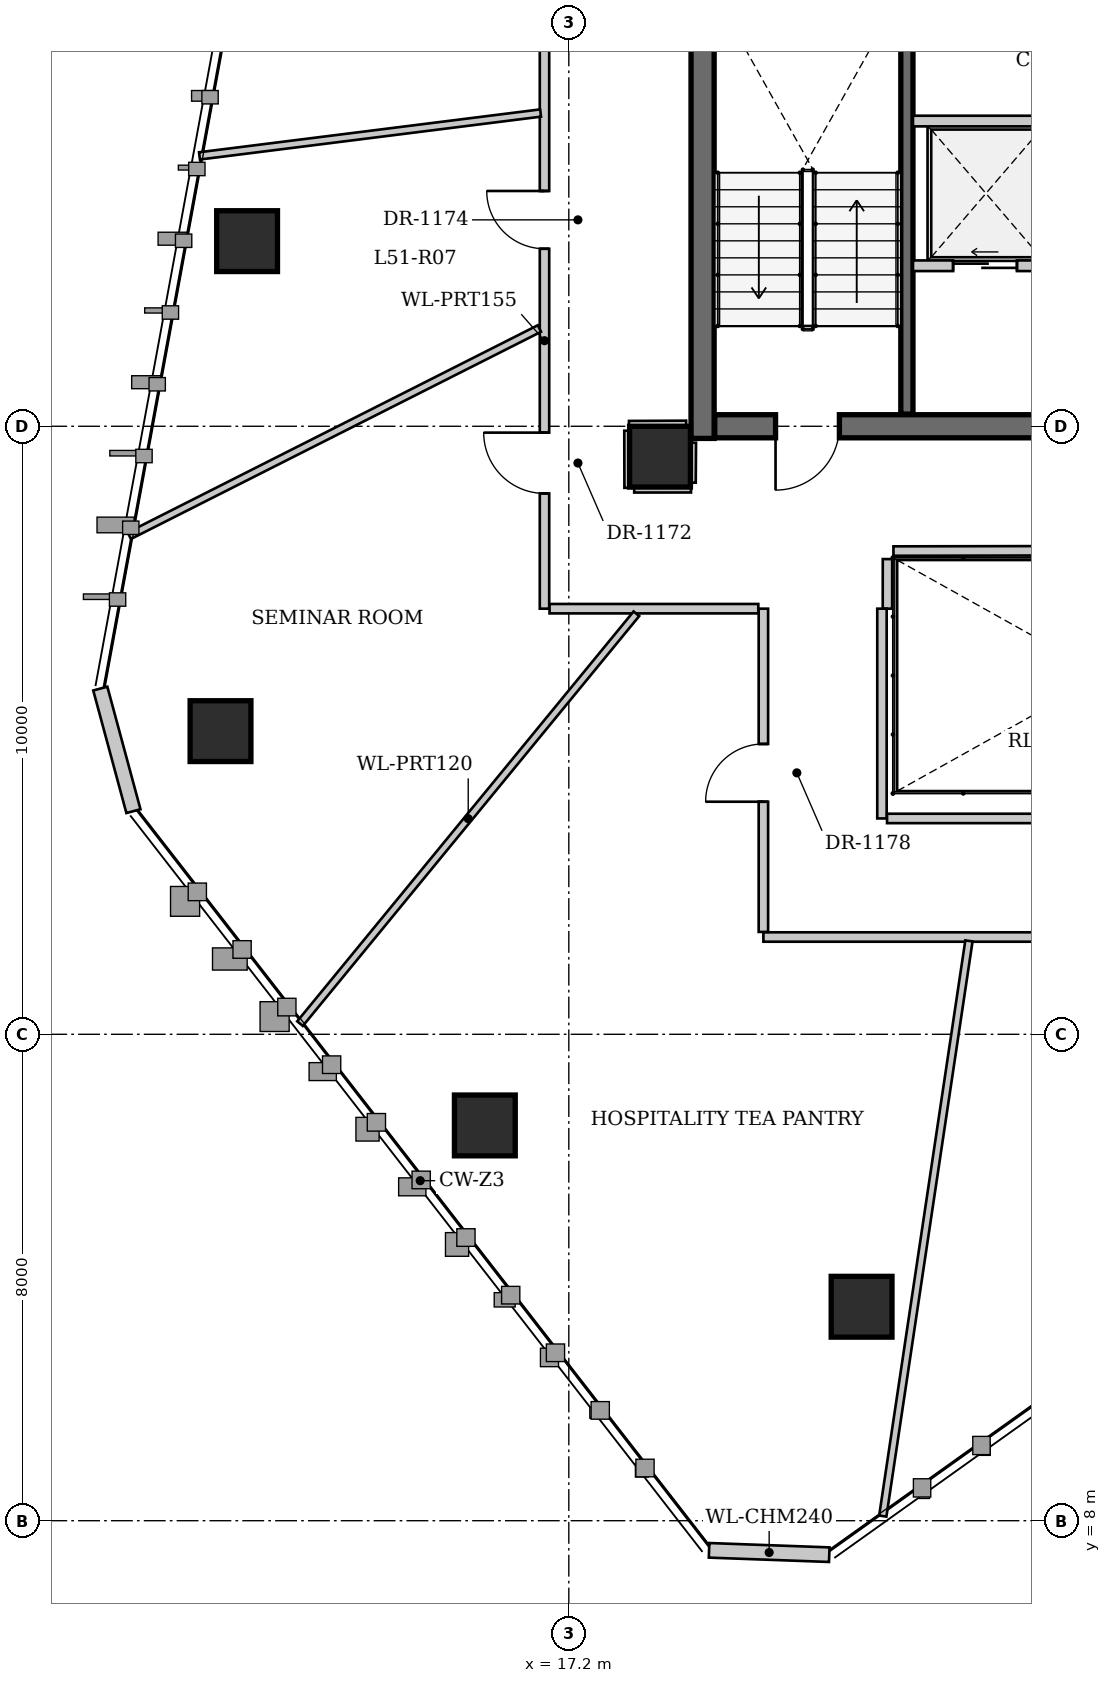
"""IFC4 building model, lengths in metres.
Left out: names, types, materials, properties, quantities, classifications, styles, units other than length and angle.
Written with IfcOpenShell. Run it as: python <this file> out.ifc"""

import sys

from ifc_helpers import new_model, si_unit, direction, frame, frame_2d, origin, origin_2d, place, context, subcontext, project, spatial, rectangle, extrude, source, transform, mapped, element, fill, save


model = new_model("IFC4")
c1 = context("Model", 3, precision=1e-05, world=origin(), true_north=direction((0.0, 1.0)))
c2 = subcontext(c1, "Body", "Model", "MODEL_VIEW")
j1 = project(units=[si_unit("LENGTHUNIT", "METRE"), si_unit("PLANEANGLEUNIT", "RADIAN")], contexts=[c1])
p1 = place(None, origin())
s1 = spatial("IfcSite", under=j1, at=p1, CompositionType="ELEMENT")
p2 = place(p1, origin())
s2 = spatial("IfcBuilding", under=s1, at=p2, CompositionType="ELEMENT")
p3 = place(p2, frame((0.0, 0.0, 195.0)))
s3 = spatial("IfcBuildingStorey", under=s2, at=p3, CompositionType="ELEMENT", Elevation=195.0)
for number, where, z_axis, x_axis in (
    (1, (22.015, 11.519, 0.0), (0.0, 0.0, 1.0), (1.0, 0.0, 0.0)),
    (2, (15.819, 14.501, 0.0), (0.0, 0.0, 1.0), (1.0, 0.0, 0.0)),
    (3, (11.472, 20.986, 0.0), (0.0, 0.0, 1.0), (1.0, 0.0, 0.0)),
    (4, (11.909, 29.045, 0.0), (0.0, 0.0, 1.0), (1.0, 0.0, 0.0)),
    (5, (18.7, 25.5, 0.0), (0.0, 0.0, 1.0), (1.0, 0.0, 0.0)),
):
    element("IfcColumn", number, at=place(p3, frame(where, z_axis=z_axis, x_axis=x_axis)), inside=s3, PredefinedType="COLUMN", context=c2, shape_type="SweptSolid", body=[
        extrude(rectangle(XDim=1.0, YDim=1.0, at=origin_2d()), origin(), (0.0, 0.0, 1.0), 3.23),
    ])
p4 = place(p3, frame((21.483, 7.441, 0.0), z_axis=(0.0, 0.0, 1.0), x_axis=(-0.999345597318, 0.036171495987, 0.0)))
e6 = element("IfcWall", 6, at=p4, inside=s3, PredefinedType="SOLIDWALL", context=c2, shape_type="SweptSolid", body=[
    extrude(rectangle(XDim=1.978, YDim=0.24, at=frame_2d((0.989, 0.0))), origin(), (0.0, 0.0, 1.0), 3.23),
])
p5 = place(p3, frame((10.04, 19.67, 0.0), z_axis=(0.0, 0.0, 1.0), x_axis=(-0.260920802659, 0.965360209839, 0.0)))
e7 = element("IfcWall", 7, at=p5, inside=s3, PredefinedType="SOLIDWALL", context=c2, shape_type="SweptSolid", body=[
    extrude(rectangle(XDim=2.088, YDim=0.24, at=frame_2d((1.044, 0.0))), origin(), (0.0, 0.0, 1.0), 3.23),
])
p6 = place(p3, frame((19.4, 25.8, 0.0), z_axis=(0.0, 0.0, 1.0), x_axis=(0.0, 1.0, 0.0)))
e8 = element("IfcWall", 8, at=p6, inside=s3, PredefinedType="SHEAR", context=c2, shape_type="SweptSolid", body=[
    extrude(rectangle(XDim=10.8, YDim=0.38, at=frame_2d((5.4, 0.0))), origin(), (0.0, 0.0, 1.0), 3.5),
])
p7 = place(p3, frame((32.4, 26.0, 0.0), z_axis=(0.0, 0.0, 1.0), x_axis=(-1.0, 0.0, 0.0)))
e9 = element("IfcWall", 9, at=p7, inside=s3, PredefinedType="SHEAR", context=c2, shape_type="SweptSolid", body=[
    extrude(rectangle(XDim=12.8, YDim=0.38, at=frame_2d((6.4, 0.0))), origin(), (0.0, 0.0, 1.0), 3.5),
])
p8 = place(p7, frame((10.75, 0.0, 0.0)))
e10 = element("IfcOpeningElement", 10, at=p8, cuts=e9, PredefinedType="OPENING", context=c2, shape_type="SweptSolid", body=[
    extrude(rectangle(XDim=1.05, YDim=2.15, at=frame_2d((0.525, 1.075))), frame((0.0, 0.2, 0.0), z_axis=(0.0, -1.0, 0.0), x_axis=(1.0, 0.0, 0.0)), (0.0, 0.0, 1.0), 0.4),
])
p9 = place(p7, frame((5.67, 0.0, 0.0)))
e11 = element("IfcOpeningElement", 11, at=p9, cuts=e9, PredefinedType="OPENING", context=c2, shape_type="SweptSolid", body=[
    extrude(rectangle(XDim=1.45, YDim=2.2, at=frame_2d((0.725, 1.1))), frame((0.0, 0.2, 0.0), z_axis=(0.0, -1.0, 0.0), x_axis=(1.0, 0.0, 0.0)), (0.0, 0.0, 1.0), 0.4),
])
p10 = place(p3, frame((22.76, 26.2, 0.0), z_axis=(0.0, 0.0, 1.0), x_axis=(0.0, 1.0, 0.0)))
e12 = element("IfcWall", 12, at=p10, inside=s3, PredefinedType="SHEAR", context=c2, shape_type="SweptSolid", body=[
    extrude(rectangle(XDim=10.0, YDim=0.2, at=frame_2d((5.0, 0.0))), origin(), (0.0, 0.0, 1.0), 3.5),
])
p11 = place(p3, frame((22.86, 31.02, 0.0), z_axis=(0.0, 0.0, 1.0), x_axis=(1.0, 0.0, 0.0)))
e13 = element("IfcWall", 13, at=p11, inside=s3, PredefinedType="SOLIDWALL", context=c2, shape_type="SweptSolid", body=[
    extrude(rectangle(XDim=6.28, YDim=0.175, at=frame_2d((3.14, 0.0))), origin(), (0.0, 0.0, 1.0), 3.23),
])
p12 = place(p3, frame((22.86, 28.64, 0.0), z_axis=(0.0, 0.0, 1.0), x_axis=(1.0, 0.0, 0.0)))
e14 = element("IfcWall", 14, at=p12, inside=s3, PredefinedType="SOLIDWALL", context=c2, shape_type="SweptSolid", body=[
    extrude(rectangle(XDim=6.28, YDim=0.175, at=frame_2d((3.14, 0.0))), origin(), (0.0, 0.0, 1.0), 3.23),
])
p13 = place(p12, frame((0.66, 0.0, 0.0)))
e15 = element("IfcOpeningElement", 15, at=p13, cuts=e14, PredefinedType="OPENING", context=c2, shape_type="SweptSolid", body=[
    extrude(rectangle(XDim=1.05, YDim=2.15, at=frame_2d((0.525, 1.075))), frame((0.0, 0.098, 0.0), z_axis=(0.0, -1.0, 0.0), x_axis=(1.0, 0.0, 0.0)), (0.0, 0.0, 1.0), 0.195),
])
p14 = place(p12, frame((2.62, 0.0, 0.0)))
e16 = element("IfcOpeningElement", 16, at=p14, cuts=e14, PredefinedType="OPENING", context=c2, shape_type="SweptSolid", body=[
    extrude(rectangle(XDim=1.05, YDim=2.15, at=frame_2d((0.525, 1.075))), frame((0.0, 0.098, 0.0), z_axis=(0.0, -1.0, 0.0), x_axis=(1.0, 0.0, 0.0)), (0.0, 0.0, 1.0), 0.195),
])
p15 = place(p12, frame((4.56, 0.0, 0.0)))
e17 = element("IfcOpeningElement", 17, at=p15, cuts=e14, PredefinedType="OPENING", context=c2, shape_type="SweptSolid", body=[
    extrude(rectangle(XDim=1.05, YDim=2.15, at=frame_2d((0.525, 1.075))), frame((0.0, 0.098, 0.0), z_axis=(0.0, -1.0, 0.0), x_axis=(1.0, 0.0, 0.0)), (0.0, 0.0, 1.0), 0.195),
])
p16 = place(p3, frame((16.8, 23.0, 0.0), z_axis=(0.0, 0.0, 1.0), x_axis=(0.0, 1.0, 0.0)))
e18 = element("IfcWall", 18, at=p16, inside=s3, PredefinedType="PARTITIONING", context=c2, shape_type="SweptSolid", body=[
    extrude(rectangle(XDim=12.2, YDim=0.155, at=frame_2d((6.1, 0.0))), origin(), (0.0, 0.0, 1.0), 3.23),
])
p17 = place(p16, frame((1.896, 0.0, 0.0)))
e19 = element("IfcOpeningElement", 19, at=p17, cuts=e18, PredefinedType="OPENING", context=c2, shape_type="SweptSolid", body=[
    extrude(rectangle(XDim=1.0, YDim=2.15, at=frame_2d((0.5, 1.075))), frame((0.0, 0.087, 0.0), z_axis=(0.0, -1.0, 0.0), x_axis=(1.0, 0.0, 0.0)), (0.0, 0.0, 1.0), 0.175),
])
p18 = place(p16, frame((9.632, 0.0, 0.0)))
e20 = element("IfcOpeningElement", 20, at=p18, cuts=e18, PredefinedType="OPENING", context=c2, shape_type="SweptSolid", body=[
    extrude(rectangle(XDim=0.95, YDim=2.15, at=frame_2d((0.475, 1.075))), frame((0.0, 0.087, 0.0), z_axis=(0.0, -1.0, 0.0), x_axis=(1.0, 0.0, 0.0)), (0.0, 0.0, 1.0), 0.175),
])
p19 = place(p16, frame((5.92, 0.0, 0.0)))
e21 = element("IfcOpeningElement", 21, at=p19, cuts=e18, PredefinedType="OPENING", context=c2, shape_type="SweptSolid", body=[
    extrude(rectangle(XDim=0.95, YDim=2.15, at=frame_2d((0.475, 1.075))), frame((0.0, 0.087, 0.0), z_axis=(0.0, -1.0, 0.0), x_axis=(1.0, 0.0, 0.0)), (0.0, 0.0, 1.0), 0.175),
])
p20 = place(p3, frame((31.6, 17.6, 0.0), z_axis=(0.0, 0.0, 1.0), x_axis=(-1.0, 0.0, 0.0)))
e22 = element("IfcWall", 22, at=p20, inside=s3, PredefinedType="PARTITIONING", context=c2, shape_type="SweptSolid", body=[
    extrude(rectangle(XDim=11.2, YDim=0.155, at=frame_2d((5.6, 0.0))), origin(), (0.0, 0.0, 1.0), 3.23),
])
p21 = place(p20, frame((3.475, 0.0, 0.0)))
e23 = element("IfcOpeningElement", 23, at=p21, cuts=e22, PredefinedType="OPENING", context=c2, shape_type="SweptSolid", body=[
    extrude(rectangle(XDim=1.0, YDim=2.15, at=frame_2d((0.5, 1.075))), frame((0.0, 0.087, 0.0), z_axis=(0.0, -1.0, 0.0), x_axis=(1.0, 0.0, 0.0)), (0.0, 0.0, 1.0), 0.175),
])
p22 = place(p3, frame((20.4, 17.684, 0.0), z_axis=(0.0, 0.0, 1.0), x_axis=(0.0, 1.0, 0.0)))
e24 = element("IfcWall", 24, at=p22, inside=s3, PredefinedType="PARTITIONING", context=c2, shape_type="SweptSolid", body=[
    extrude(rectangle(XDim=5.316, YDim=0.155, at=frame_2d((2.658, 0.0))), origin(), (0.0, 0.0, 1.0), 2.589),
])
p23 = place(p22, frame((2.142, 0.0, 0.0)))
e25 = element("IfcOpeningElement", 25, at=p23, cuts=e24, PredefinedType="OPENING", context=c2, shape_type="SweptSolid", body=[
    extrude(rectangle(XDim=0.95, YDim=2.15, at=frame_2d((0.475, 1.075))), frame((0.0, 0.087, 0.0), z_axis=(0.0, -1.0, 0.0), x_axis=(1.0, 0.0, 0.0)), (0.0, 0.0, 1.0), 0.175),
])
p24 = place(p3, frame((19.13, 26.015, 0.0), z_axis=(0.0, 0.0, 1.0), x_axis=(-0.99999026157, -0.004413248818, 0.0)))
e26 = element("IfcWall", 26, at=p24, inside=s3, PredefinedType="PARTITIONING", context=c2, shape_type="SweptSolid", body=[
    extrude(rectangle(XDim=0.94, YDim=0.155, at=frame_2d((0.47, 0.0))), origin(), (0.0, 0.0, 1.0), 3.23),
])
p25 = place(p3, frame((18.19, 25.927, 0.0), z_axis=(0.0, 0.0, 1.0), x_axis=(0.002078997586, -0.999997838882, 0.0)))
e27 = element("IfcWall", 27, at=p25, inside=s3, PredefinedType="PARTITIONING", context=c2, shape_type="SweptSolid", body=[
    extrude(rectangle(XDim=0.939, YDim=0.155, at=frame_2d((0.47, 0.0))), origin(), (0.0, 0.0, 1.0), 3.23),
])
p26 = place(p3, frame((18.275, 24.988, 0.0), z_axis=(0.0, 0.0, 1.0), x_axis=(0.999999692748, 0.0007839036, 0.0)))
e28 = element("IfcWall", 28, at=p26, inside=s3, PredefinedType="PARTITIONING", context=c2, shape_type="SweptSolid", body=[
    extrude(rectangle(XDim=0.934, YDim=0.155, at=frame_2d((0.467, 0.0))), origin(), (0.0, 0.0, 1.0), 3.23),
])
p27 = place(p3, frame((19.21, 25.072, 0.0), z_axis=(0.0, 0.0, 1.0), x_axis=(0.007420945932, 0.999972464402, 0.0)))
e29 = element("IfcWall", 29, at=p27, inside=s3, PredefinedType="PARTITIONING", context=c2, shape_type="SweptSolid", body=[
    extrude(rectangle(XDim=0.658, YDim=0.155, at=frame_2d((0.329, 0.0))), origin(), (0.0, 0.0, 1.0), 3.23),
])
p28 = place(p3, frame((20.316, 23.0, 0.0), z_axis=(0.0, 0.0, 1.0), x_axis=(-1.0, 0.0, 0.0)))
e30 = element("IfcWall", 30, at=p28, inside=s3, PredefinedType="PARTITIONING", context=c2, shape_type="SweptSolid", body=[
    extrude(rectangle(XDim=3.433, YDim=0.155, at=frame_2d((1.716, 0.0))), origin(), (0.0, 0.0, 1.0), 3.23),
])
p29 = place(p3, frame((29.416, 23.959, 0.0), z_axis=(0.0, 0.0, 1.0), x_axis=(-0.999998607957, -0.001668557745, 0.0)))
e31 = element("IfcWall", 31, at=p29, inside=s3, PredefinedType="PARTITIONING", context=c2, shape_type="SweptSolid", body=[
    extrude(rectangle(XDim=6.877, YDim=0.155, at=frame_2d((3.438, 0.0))), origin(), (0.0, 0.0, 1.0), 3.23),
])
p30 = place(p3, frame((22.441, 23.816, 0.0), z_axis=(0.0, 0.0, 1.0), x_axis=(-0.001197245475, -0.999999283301, 0.0)))
e32 = element("IfcWall", 32, at=p30, inside=s3, PredefinedType="PARTITIONING", context=c2, shape_type="SweptSolid", body=[
    extrude(rectangle(XDim=0.816, YDim=0.155, at=frame_2d((0.408, 0.0))), origin(), (0.0, 0.0, 1.0), 3.23),
])
p31 = place(p3, frame((22.35, 23.0, 0.0), z_axis=(0.0, 0.0, 1.0), x_axis=(0.0, -1.0, 0.0)))
e33 = element("IfcWall", 33, at=p31, inside=s3, PredefinedType="PARTITIONING", context=c2, shape_type="SweptSolid", body=[
    extrude(rectangle(XDim=3.45, YDim=0.155, at=frame_2d((1.725, 0.0))), origin(), (0.0, 0.0, 1.0), 3.23),
])
p32 = place(p3, frame((22.434, 19.55, 0.0), z_axis=(0.0, 0.0, 1.0), x_axis=(1.0, 0.0, 0.0)))
e34 = element("IfcWall", 34, at=p32, inside=s3, PredefinedType="PARTITIONING", context=c2, shape_type="SweptSolid", body=[
    extrude(rectangle(XDim=7.216, YDim=0.155, at=frame_2d((3.608, 0.0))), origin(), (0.0, 0.0, 1.0), 3.23),
])
p33 = place(p3, frame((18.312, 22.917, 0.0), z_axis=(0.0, 0.0, 1.0), x_axis=(-0.634377534126, -0.773023378816, 0.0)))
e35 = element("IfcWall", 35, at=p33, inside=s3, PredefinedType="PARTITIONING", context=c2, shape_type="SweptSolid", body=[
    extrude(rectangle(XDim=8.72, YDim=0.12, at=frame_2d((4.36, 0.0))), origin(), (0.0, 0.0, 1.0), 3.23),
])
p34 = place(p3, frame((9.972, 24.2, 0.0), z_axis=(0.0, 0.0, 1.0), x_axis=(0.892532461232, 0.450983154504, 0.0)))
e36 = element("IfcWall", 36, at=p34, inside=s3, PredefinedType="PARTITIONING", context=c2, shape_type="SweptSolid", body=[
    extrude(rectangle(XDim=7.557, YDim=0.12, at=frame_2d((3.778, 0.0))), origin(), (0.0, 0.0, 1.0), 3.23),
])
p35 = place(p3, frame((23.781, 17.536, 0.0), z_axis=(0.0, 0.0, 1.0), x_axis=(-0.148146984472, -0.988965353787, 0.0)))
e37 = element("IfcWall", 37, at=p35, inside=s3, PredefinedType="PARTITIONING", context=c2, shape_type="SweptSolid", body=[
    extrude(rectangle(XDim=9.565, YDim=0.12, at=frame_2d((4.782, 0.0))), origin(), (0.0, 0.0, 1.0), 3.23),
])
p36 = place(p3, frame((16.736, 31.152, 0.0), z_axis=(0.0, 0.0, 1.0), x_axis=(-0.992197947241, -0.124672504948, 0.0)))
e38 = element("IfcWall", 38, at=p36, inside=s3, PredefinedType="PARTITIONING", context=c2, shape_type="SweptSolid", body=[
    extrude(rectangle(XDim=5.654, YDim=0.12, at=frame_2d((2.827, 0.0))), origin(), (0.0, 0.0, 1.0), 3.23),
])
m1 = source(origin(), c2, "Body", "SweptSolid", [
    extrude(rectangle(XDim=1.05, YDim=2.15, at=frame_2d((0.525, 1.075))), frame((0.0, 0.025, 0.0), z_axis=(0.0, -1.0, 0.0), x_axis=(1.0, 0.0, 0.0)), (0.0, 0.0, 1.0), 0.05),
])
p37 = place(p8, origin())
e39 = element("IfcDoor", 39, at=p37, inside=s3, OperationType="SINGLE_SWING_RIGHT", PredefinedType="DOOR", context=c2, shape_type="MappedRepresentation", body=[
    mapped(m1, transform((0.0, 0.0, 0.0), x_axis=(1.0, 0.0, 0.0), y_axis=(0.0, 1.0, 0.0), z_axis=(0.0, 0.0, 1.0), scale=1.0)),
])
fill(e10, e39)
m2 = source(origin(), c2, "Body", "SweptSolid", [
    extrude(rectangle(XDim=1.05, YDim=2.15, at=frame_2d((0.525, 1.075))), frame((0.0, 0.025, 0.0), z_axis=(0.0, -1.0, 0.0), x_axis=(1.0, 0.0, 0.0)), (0.0, 0.0, 1.0), 0.05),
])
p38 = place(p13, origin())
e40 = element("IfcDoor", 40, at=p38, inside=s3, OperationType="SLIDING_TO_LEFT", PredefinedType="DOOR", context=c2, shape_type="MappedRepresentation", body=[
    mapped(m2, transform((0.0, 0.0, 0.0), x_axis=(1.0, 0.0, 0.0), y_axis=(0.0, 1.0, 0.0), z_axis=(0.0, 0.0, 1.0), scale=1.0)),
])
fill(e15, e40)
m3 = source(origin(), c2, "Body", "SweptSolid", [
    extrude(rectangle(XDim=1.0, YDim=2.15, at=frame_2d((0.5, 1.075))), frame((0.0, 0.025, 0.0), z_axis=(0.0, -1.0, 0.0), x_axis=(1.0, 0.0, 0.0)), (0.0, 0.0, 1.0), 0.05),
])
p39 = place(p17, origin())
e41 = element("IfcDoor", 41, at=p39, inside=s3, OperationType="SINGLE_SWING_RIGHT", PredefinedType="DOOR", context=c2, shape_type="MappedRepresentation", body=[
    mapped(m3, transform((0.0, 0.0, 0.0), x_axis=(1.0, 0.0, 0.0), y_axis=(0.0, 1.0, 0.0), z_axis=(0.0, 0.0, 1.0), scale=1.0)),
])
fill(e19, e41)
m4 = source(origin(), c2, "Body", "SweptSolid", [
    extrude(rectangle(XDim=0.95, YDim=2.15, at=frame_2d((0.475, 1.075))), frame((0.0, 0.025, 0.0), z_axis=(0.0, -1.0, 0.0), x_axis=(1.0, 0.0, 0.0)), (0.0, 0.0, 1.0), 0.05),
])
p40 = place(p19, origin())
e42 = element("IfcDoor", 42, at=p40, inside=s3, OperationType="SINGLE_SWING_RIGHT", PredefinedType="DOOR", context=c2, shape_type="MappedRepresentation", body=[
    mapped(m4, transform((0.0, 0.0, 0.0), x_axis=(1.0, 0.0, 0.0), y_axis=(0.0, 1.0, 0.0), z_axis=(0.0, 0.0, 1.0), scale=1.0)),
])
fill(e21, e42)
p41 = place(p23, origin())
e43 = element("IfcDoor", 43, at=p41, inside=s3, OperationType="SINGLE_SWING_LEFT", PredefinedType="DOOR", context=c2, shape_type="MappedRepresentation", body=[
    mapped(m4, transform((0.0, 0.0, 0.0), x_axis=(1.0, 0.0, 0.0), y_axis=(0.0, 1.0, 0.0), z_axis=(0.0, 0.0, 1.0), scale=1.0)),
])
fill(e25, e43)
save(model, sys.argv[1])
